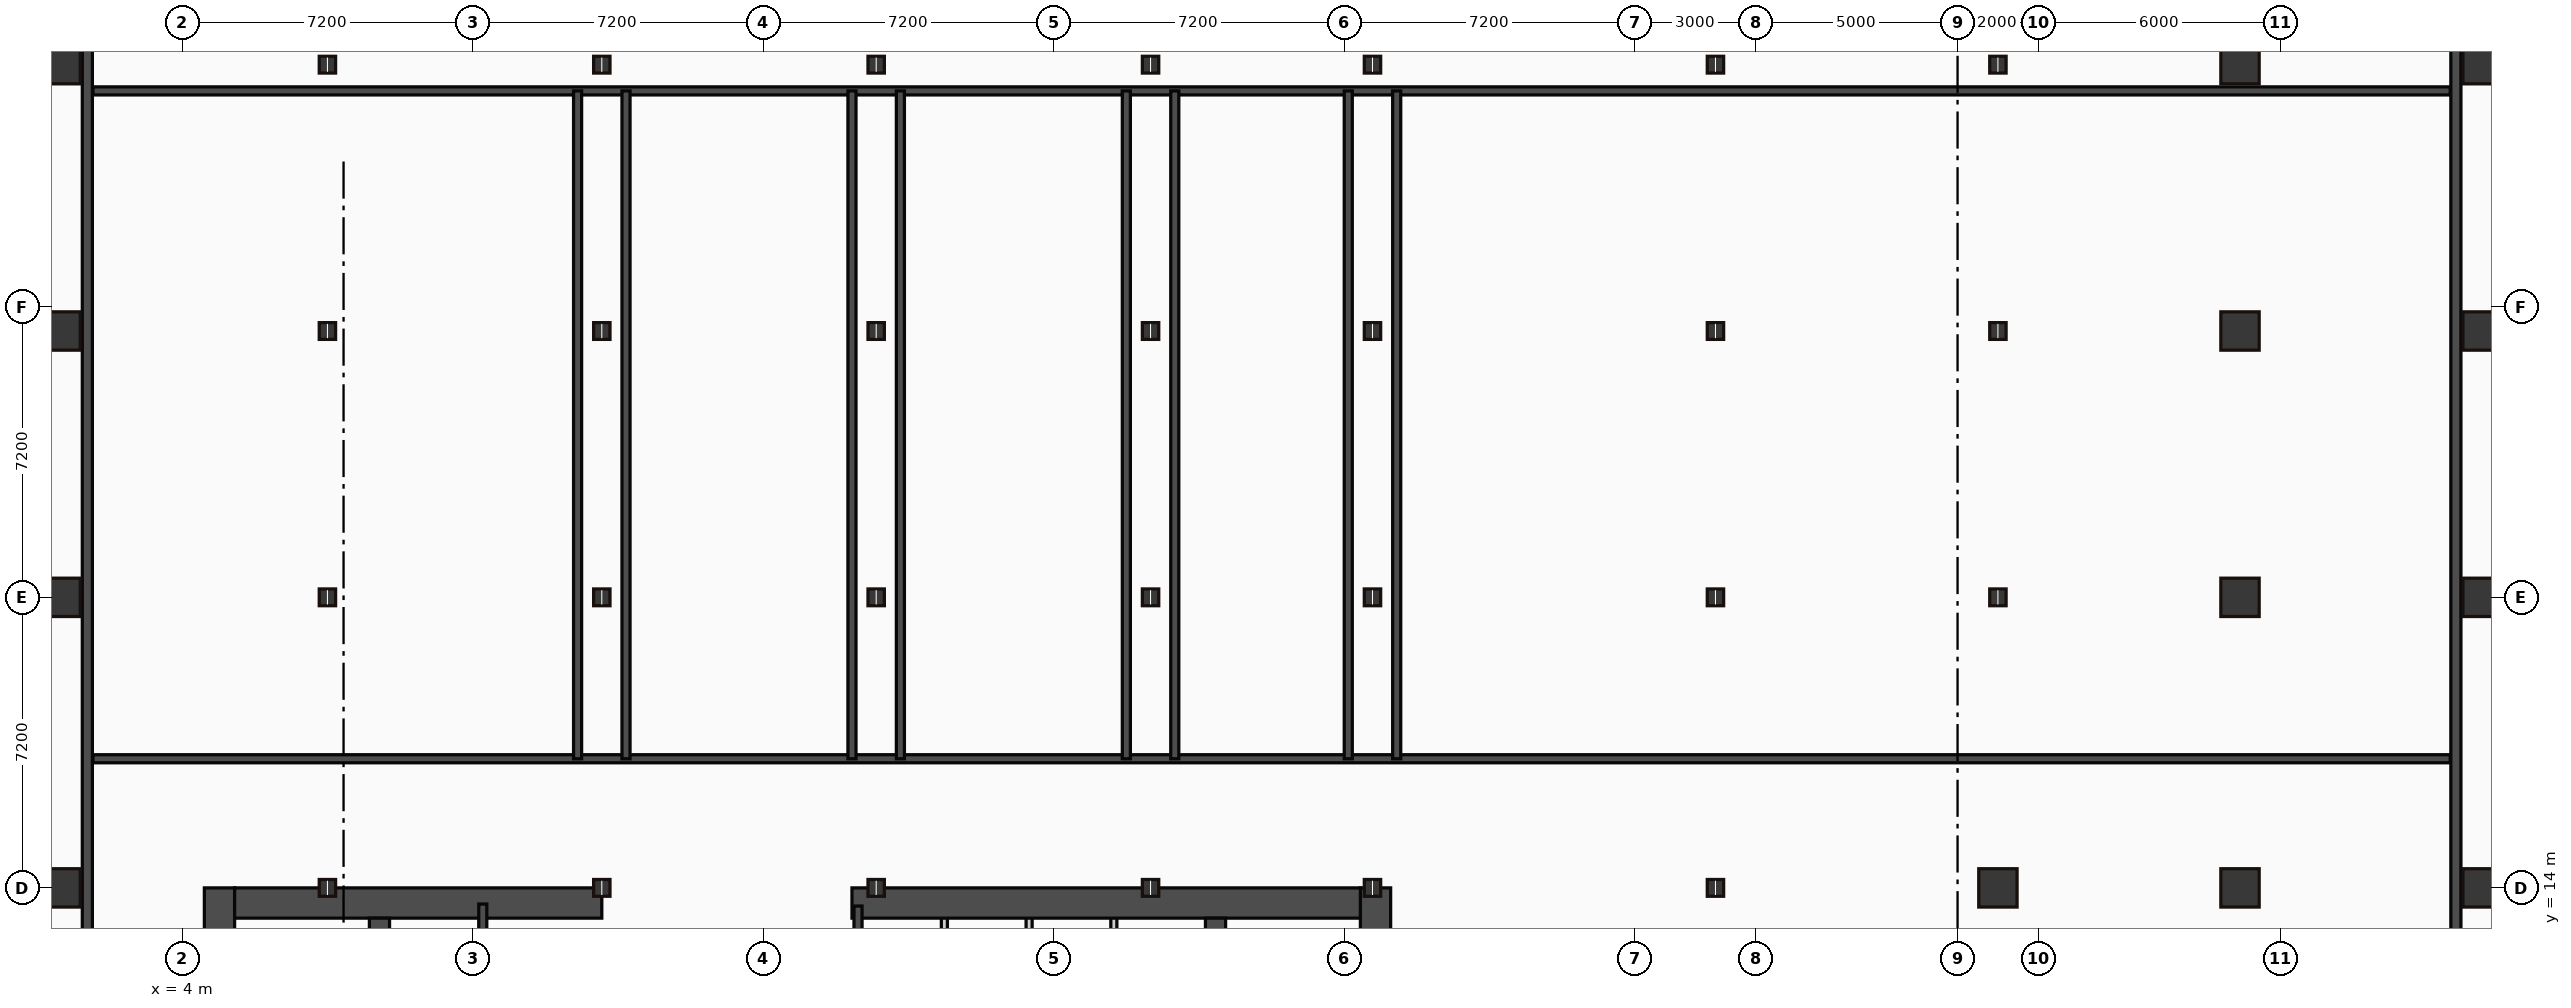
"""IFC4 building model, lengths in metres.
Left out: names, types, materials, properties, quantities, classifications, styles, units other than length and angle.
Written with IfcOpenShell. Run it as: python <this file> out.ifc"""

import sys

from ifc_helpers import new_model, si_unit, direction, frame, frame_2d, origin, origin_2d, place, context, subcontext, project, spatial, rectangle, hollow_rectangle, i_section, extrude, source, transform, mapped, element, fill, save


model = new_model("IFC4")
c1 = context("Model", 3, precision=1e-05, world=origin(), true_north=direction((0.0, 1.0)))
c2 = subcontext(c1, "Body", "Model", "MODEL_VIEW")
j1 = project(units=[si_unit("LENGTHUNIT", "METRE"), si_unit("PLANEANGLEUNIT", "RADIAN")], contexts=[c1])
p1 = place(None, origin())
s1 = spatial("IfcSite", under=j1, at=p1, CompositionType="ELEMENT")
p2 = place(p1, origin())
s2 = spatial("IfcBuilding", under=s1, at=p2, CompositionType="ELEMENT")
p3 = place(p2, frame((0.0, 0.0, 84.15)))
s3 = spatial("IfcBuildingStorey", under=s2, at=p3, CompositionType="ELEMENT", Elevation=84.15)
m1 = source(origin(), c2, "Body", "SweptSolid", [
    extrude(rectangle(XDim=13.1, YDim=0.75, at=frame_2d((6.55, 0.0))), origin(), (0.0, 0.0, 1.0), 4.5),
])
for number, where, z_axis, x_axis in (
    (1, (4.925, 0.9, 0.0), (0.0, 0.0, 1.0), (0.0, 1.0, 0.0)),
    (2, (33.575, 0.9, 0.0), (0.0, 0.0, 1.0), (0.0, 1.0, 0.0)),
):
    element("IfcWall", number, at=place(p3, frame(where, z_axis=z_axis, x_axis=x_axis)), inside=s3, PredefinedType="SHEAR", context=c2, shape_type="MappedRepresentation", body=[
        mapped(m1, transform((0.0, 0.0, 0.0))),
    ])
m2 = source(origin(), c2, "Body", "SweptSolid", [
    extrude(rectangle(XDim=9.1, YDim=0.75, at=frame_2d((4.55, 0.0))), origin(), (0.0, 0.0, 1.0), 4.5),
])
p4 = place(p3, frame((5.3, 13.625, 0.0), z_axis=(0.0, 0.0, 1.0), x_axis=(1.0, 0.0, 0.0)))
e3 = element("IfcWall", 3, at=p4, inside=s3, PredefinedType="SHEAR", context=c2, shape_type="MappedRepresentation", body=[
    mapped(m2, transform((0.0, 0.0, 0.0))),
])
p5 = place(p4, frame((4.1, 0.0, 0.0)))
e4 = element("IfcOpeningElement", 4, at=p5, cuts=e3, PredefinedType="OPENING", context=c2, shape_type="SweptSolid", body=[
    extrude(rectangle(XDim=1.1, YDim=2.15, at=frame_2d((0.55, 1.075))), frame((0.0, 0.385, 0.0), z_axis=(0.0, -1.0, 0.0), x_axis=(1.0, 0.0, 0.0)), (0.0, 0.0, 1.0), 0.77),
])
m3 = source(origin(), c2, "Body", "SweptSolid", [
    extrude(rectangle(XDim=12.6, YDim=0.75, at=frame_2d((6.3, 0.0))), origin(), (0.0, 0.0, 1.0), 4.5),
])
p6 = place(p3, frame((20.6, 13.625, 0.0), z_axis=(0.0, 0.0, 1.0), x_axis=(1.0, 0.0, 0.0)))
e5 = element("IfcWall", 5, at=p6, inside=s3, PredefinedType="SHEAR", context=c2, shape_type="MappedRepresentation", body=[
    mapped(m3, transform((0.0, 0.0, 0.0))),
])
p7 = place(p6, frame((9.25, 0.0, 0.0)))
e6 = element("IfcOpeningElement", 6, at=p7, cuts=e5, PredefinedType="OPENING", context=c2, shape_type="SweptSolid", body=[
    extrude(rectangle(XDim=1.1, YDim=2.15, at=frame_2d((0.55, 1.075))), frame((0.0, 0.385, 0.0), z_axis=(0.0, -1.0, 0.0), x_axis=(1.0, 0.0, 0.0)), (0.0, 0.0, 1.0), 0.77),
])
m4 = source(origin(), c2, "Body", "SweptSolid", [
    extrude(rectangle(XDim=12.35, YDim=0.5, at=frame_2d((6.175, 0.0))), origin(), (0.0, 0.0, 1.0), 4.5),
])
for number, where, z_axis, x_axis in (
    (7, (8.89, 0.9, 0.0), (0.0, 0.0, 1.0), (0.0, 1.0, 0.0)),
    (8, (29.61, 0.9, 0.0), (0.0, 0.0, 1.0), (0.0, 1.0, 0.0)),
):
    element("IfcWall", number, at=place(p3, frame(where, z_axis=z_axis, x_axis=x_axis)), inside=s3, PredefinedType="SHEAR", context=c2, shape_type="MappedRepresentation", body=[
        mapped(m4, transform((0.0, 0.0, 0.0))),
    ])
m5 = source(origin(), c2, "Body", "SweptSolid", [
    extrude(hollow_rectangle(XDim=0.95, YDim=0.95, WallThickness=0.045, at=origin_2d()), origin(), (0.0, 0.0, 1.0), 4.5),
])
for number, where, z_axis, x_axis in (
    (9, (1.0, 14.0, 0.0), (0.0, 0.0, 1.0), (1.0, 0.0, 0.0)),
    (10, (1.0, 21.2, 0.0), (0.0, 0.0, 1.0), (1.0, 0.0, 0.0)),
    (11, (1.0, 27.8, 0.0), (0.0, 0.0, 1.0), (1.0, 0.0, 0.0)),
    (12, (1.0, 34.4, 0.0), (0.0, 0.0, 1.0), (1.0, 0.0, 0.0)),
):
    element("IfcColumn", number, at=place(p3, frame(where, z_axis=z_axis, x_axis=x_axis)), inside=s3, PredefinedType="COLUMN", context=c2, shape_type="MappedRepresentation", body=[
        mapped(m5, transform((0.0, 0.0, 0.0))),
    ])
m6 = source(origin(), c2, "Body", "SweptSolid", [
    extrude(i_section(OverallWidth=0.406, OverallDepth=0.416, WebThickness=0.03, FlangeThickness=0.048, at=origin_2d()), origin(), (0.0, 0.0, 1.0), 4.5),
])
for number, where, z_axis, x_axis in (
    (13, (7.6, 14.0, 0.0), (0.0, 0.0, 1.0), (1.0, 0.0, 0.0)),
    (14, (7.6, 21.2, 0.0), (0.0, 0.0, 1.0), (1.0, 0.0, 0.0)),
    (15, (7.6, 27.8, 0.0), (0.0, 0.0, 1.0), (1.0, 0.0, 0.0)),
    (16, (7.6, 34.4, 0.0), (0.0, 0.0, 1.0), (1.0, 0.0, 0.0)),
    (17, (14.4, 14.0, 0.0), (0.0, 0.0, 1.0), (1.0, 0.0, 0.0)),
    (18, (14.4, 21.2, 0.0), (0.0, 0.0, 1.0), (1.0, 0.0, 0.0)),
    (19, (14.4, 27.8, 0.0), (0.0, 0.0, 1.0), (1.0, 0.0, 0.0)),
    (20, (14.4, 34.4, 0.0), (0.0, 0.0, 1.0), (1.0, 0.0, 0.0)),
    (21, (21.2, 14.0, 0.0), (0.0, 0.0, 1.0), (1.0, 0.0, 0.0)),
    (22, (21.2, 21.2, 0.0), (0.0, 0.0, 1.0), (1.0, 0.0, 0.0)),
    (23, (21.2, 27.8, 0.0), (0.0, 0.0, 1.0), (1.0, 0.0, 0.0)),
    (24, (21.2, 34.4, 0.0), (0.0, 0.0, 1.0), (1.0, 0.0, 0.0)),
    (25, (28.0, 14.0, 0.0), (0.0, 0.0, 1.0), (1.0, 0.0, 0.0)),
    (26, (28.0, 21.2, 0.0), (0.0, 0.0, 1.0), (1.0, 0.0, 0.0)),
    (27, (28.0, 27.8, 0.0), (0.0, 0.0, 1.0), (1.0, 0.0, 0.0)),
    (28, (28.0, 34.4, 0.0), (0.0, 0.0, 1.0), (1.0, 0.0, 0.0)),
    (29, (33.5, 14.0, 0.0), (0.0, 0.0, 1.0), (1.0, 0.0, 0.0)),
    (30, (33.5, 21.2, 0.0), (0.0, 0.0, 1.0), (1.0, 0.0, 0.0)),
    (31, (33.5, 27.8, 0.0), (0.0, 0.0, 1.0), (1.0, 0.0, 0.0)),
    (32, (33.5, 34.4, 0.0), (0.0, 0.0, 1.0), (1.0, 0.0, 0.0)),
    (33, (42.0, 14.0, 0.0), (0.0, 0.0, 1.0), (1.0, 0.0, 0.0)),
    (34, (42.0, 21.2, 0.0), (0.0, 0.0, 1.0), (1.0, 0.0, 0.0)),
    (35, (42.0, 27.8, 0.0), (0.0, 0.0, 1.0), (1.0, 0.0, 0.0)),
    (36, (42.0, 34.4, 0.0), (0.0, 0.0, 1.0), (1.0, 0.0, 0.0)),
):
    element("IfcColumn", number, at=place(p3, frame(where, z_axis=z_axis, x_axis=x_axis)), inside=s3, PredefinedType="COLUMN", context=c2, shape_type="MappedRepresentation", body=[
        mapped(m6, transform((0.0, 0.0, 0.0))),
    ])
p8 = place(p3, frame((49.0, 14.0, 0.0), z_axis=(0.0, 0.0, 1.0), x_axis=(1.0, 0.0, 0.0)))
e37 = element("IfcColumn", 37, at=p8, inside=s3, PredefinedType="COLUMN", context=c2, shape_type="MappedRepresentation", body=[
    mapped(m5, transform((0.0, 0.0, 0.0))),
])
for number, where, z_axis, x_axis in (
    (38, (49.0, 21.2, 0.0), (0.0, 0.0, 1.0), (1.0, 0.0, 0.0)),
    (39, (49.0, 27.8, 0.0), (0.0, 0.0, 1.0), (1.0, 0.0, 0.0)),
    (40, (49.0, 34.4, 0.0), (0.0, 0.0, 1.0), (1.0, 0.0, 0.0)),
):
    element("IfcColumn", number, at=place(p3, frame(where, z_axis=z_axis, x_axis=x_axis)), inside=s3, PredefinedType="COLUMN", context=c2, shape_type="MappedRepresentation", body=[
        mapped(m6, transform((0.0, 0.0, 0.0))),
    ])
for number, where, z_axis, x_axis in (
    (41, (55.0, 14.0, 0.0), (0.0, 0.0, 1.0), (1.0, 0.0, 0.0)),
    (42, (55.0, 21.2, 0.0), (0.0, 0.0, 1.0), (1.0, 0.0, 0.0)),
    (43, (55.0, 27.8, 0.0), (0.0, 0.0, 1.0), (1.0, 0.0, 0.0)),
    (44, (55.0, 34.4, 0.0), (0.0, 0.0, 1.0), (1.0, 0.0, 0.0)),
    (45, (61.0, 14.0, 0.0), (0.0, 0.0, 1.0), (1.0, 0.0, 0.0)),
    (46, (61.0, 21.2, 0.0), (0.0, 0.0, 1.0), (1.0, 0.0, 0.0)),
    (47, (61.0, 27.8, 0.0), (0.0, 0.0, 1.0), (1.0, 0.0, 0.0)),
    (48, (61.0, 34.4, 0.0), (0.0, 0.0, 1.0), (1.0, 0.0, 0.0)),
):
    element("IfcColumn", number, at=place(p3, frame(where, z_axis=z_axis, x_axis=x_axis)), inside=s3, PredefinedType="COLUMN", context=c2, shape_type="MappedRepresentation", body=[
        mapped(m5, transform((0.0, 0.0, 0.0))),
    ])
m7 = source(origin(), c2, "Body", "SweptSolid", [
    extrude(rectangle(XDim=29.2, YDim=0.25, at=frame_2d((14.6, 0.0))), origin(), (0.0, 0.0, 1.0), 4.25),
])
p9 = place(p3, frame((1.65, 6.15, 0.0), z_axis=(0.0, 0.0, 1.0), x_axis=(0.0, 1.0, 0.0)))
e49 = element("IfcWall", 49, at=p9, inside=s3, PredefinedType="STANDARD", context=c2, shape_type="MappedRepresentation", body=[
    mapped(m7, transform((0.0, 0.0, 0.0))),
])
m8 = source(origin(), c2, "Body", "SweptSolid", [
    extrude(rectangle(XDim=25.2, YDim=0.25, at=frame_2d((12.6, 0.0))), origin(), (0.0, 0.0, 1.0), 4.25),
])
p10 = place(p3, frame((60.35, 35.35, 0.0), z_axis=(0.0, 0.0, 1.0), x_axis=(0.0, -1.0, 0.0)))
e50 = element("IfcWall", 50, at=p10, inside=s3, PredefinedType="STANDARD", context=c2, shape_type="MappedRepresentation", body=[
    mapped(m8, transform((0.0, 0.0, 0.0))),
])
m9 = source(origin(), c2, "Body", "SweptSolid", [
    extrude(rectangle(XDim=3.18, YDim=0.2, at=frame_2d((1.59, 0.0))), origin(), (0.0, 0.0, 1.0), 4.25),
])
p11 = place(p3, frame((11.45, 10.42, 0.0), z_axis=(0.0, 0.0, 1.0), x_axis=(0.0, 1.0, 0.0)))
e51 = element("IfcWall", 51, at=p11, inside=s3, PredefinedType="PARTITIONING", context=c2, shape_type="MappedRepresentation", body=[
    mapped(m9, transform((0.0, 0.0, 0.0))),
])
m10 = source(origin(), c2, "Body", "SweptSolid", [
    extrude(rectangle(XDim=3.0, YDim=0.2, at=frame_2d((1.5, 0.0))), origin(), (0.0, 0.0, 1.0), 4.25),
])
p12 = place(p3, frame((20.75, 10.55, 0.0), z_axis=(0.0, 0.0, 1.0), x_axis=(0.0, 1.0, 0.0)))
e52 = element("IfcWall", 52, at=p12, inside=s3, PredefinedType="PARTITIONING", context=c2, shape_type="MappedRepresentation", body=[
    mapped(m10, transform((0.0, 0.0, 0.0))),
])
m11 = source(origin(), c2, "Body", "SweptSolid", [
    extrude(rectangle(XDim=2.85, YDim=0.15, at=frame_2d((1.425, 0.0))), origin(), (0.0, 0.0, 1.0), 4.25),
])
for number, where, z_axis, x_axis in (
    (53, (22.89, 10.6, 0.0), (0.0, 0.0, 1.0), (0.0, 1.0, 0.0)),
    (54, (24.99, 10.6, 0.0), (0.0, 0.0, 1.0), (0.0, 1.0, 0.0)),
    (55, (27.09, 10.6, 0.0), (0.0, 0.0, 1.0), (0.0, 1.0, 0.0)),
):
    element("IfcWall", number, at=place(p3, frame(where, z_axis=z_axis, x_axis=x_axis)), inside=s3, PredefinedType="PARTITIONING", context=c2, shape_type="MappedRepresentation", body=[
        mapped(m11, transform((0.0, 0.0, 0.0))),
    ])
m12 = source(origin(), c2, "Body", "SweptSolid", [
    extrude(rectangle(XDim=58.42, YDim=0.2, at=frame_2d((29.21, 0.0))), origin(), (0.0, 0.0, 1.0), 4.25),
])
p13 = place(p3, frame((1.79, 17.2, 0.0), z_axis=(0.0, 0.0, 1.0), x_axis=(1.0, 0.0, 0.0)))
e56 = element("IfcWall", 56, at=p13, inside=s3, PredefinedType="PARTITIONING", context=c2, shape_type="MappedRepresentation", body=[
    mapped(m12, transform((0.0, 0.0, 0.0))),
])
p14 = place(p13, frame((2.46, 0.0, 0.0)))
e57 = element("IfcOpeningElement", 57, at=p14, cuts=e56, PredefinedType="OPENING", context=c2, shape_type="SweptSolid", body=[
    extrude(rectangle(XDim=1.1, YDim=2.15, at=frame_2d((0.55, 1.075))), frame((0.0, 0.11, 0.0), z_axis=(0.0, -1.0, 0.0), x_axis=(1.0, 0.0, 0.0)), (0.0, 0.0, 1.0), 0.22),
])
p15 = place(p13, frame((14.86, 0.0, 0.0)))
e58 = element("IfcOpeningElement", 58, at=p15, cuts=e56, PredefinedType="OPENING", context=c2, shape_type="SweptSolid", body=[
    extrude(rectangle(XDim=1.1, YDim=2.15, at=frame_2d((0.55, 1.075))), frame((0.0, 0.11, 0.0), z_axis=(0.0, -1.0, 0.0), x_axis=(1.0, 0.0, 0.0)), (0.0, 0.0, 1.0), 0.22),
])
p16 = place(p13, frame((21.66, 0.0, 0.0)))
e59 = element("IfcOpeningElement", 59, at=p16, cuts=e56, PredefinedType="OPENING", context=c2, shape_type="SweptSolid", body=[
    extrude(rectangle(XDim=1.1, YDim=2.15, at=frame_2d((0.55, 1.075))), frame((0.0, 0.11, 0.0), z_axis=(0.0, -1.0, 0.0), x_axis=(1.0, 0.0, 0.0)), (0.0, 0.0, 1.0), 0.22),
])
p17 = place(p13, frame((27.86, 0.0, 0.0)))
e60 = element("IfcOpeningElement", 60, at=p17, cuts=e56, PredefinedType="OPENING", context=c2, shape_type="SweptSolid", body=[
    extrude(rectangle(XDim=1.1, YDim=2.15, at=frame_2d((0.55, 1.075))), frame((0.0, 0.11, 0.0), z_axis=(0.0, -1.0, 0.0), x_axis=(1.0, 0.0, 0.0)), (0.0, 0.0, 1.0), 0.22),
])
p18 = place(p13, frame((33.86, 0.0, 0.0)))
e61 = element("IfcOpeningElement", 61, at=p18, cuts=e56, PredefinedType="OPENING", context=c2, shape_type="SweptSolid", body=[
    extrude(rectangle(XDim=1.1, YDim=2.15, at=frame_2d((0.55, 1.075))), frame((0.0, 0.11, 0.0), z_axis=(0.0, -1.0, 0.0), x_axis=(1.0, 0.0, 0.0)), (0.0, 0.0, 1.0), 0.22),
])
p19 = place(p3, frame((1.79, 33.75, 0.0), z_axis=(0.0, 0.0, 1.0), x_axis=(1.0, 0.0, 0.0)))
e62 = element("IfcWall", 62, at=p19, inside=s3, PredefinedType="PARTITIONING", context=c2, shape_type="MappedRepresentation", body=[
    mapped(m12, transform((0.0, 0.0, 0.0))),
])
m13 = source(origin(), c2, "Body", "SweptSolid", [
    extrude(rectangle(XDim=16.55, YDim=0.2, at=frame_2d((8.275, 0.0))), origin(), (0.0, 0.0, 1.0), 4.25),
])
for number, where, z_axis, x_axis in (
    (63, (13.8, 17.2, 0.0), (0.0, 0.0, 1.0), (0.0, 1.0, 0.0)),
    (64, (15.0, 17.2, 0.0), (0.0, 0.0, 1.0), (0.0, 1.0, 0.0)),
    (65, (20.6, 17.2, 0.0), (0.0, 0.0, 1.0), (0.0, 1.0, 0.0)),
    (66, (21.8, 17.2, 0.0), (0.0, 0.0, 1.0), (0.0, 1.0, 0.0)),
    (67, (27.4, 17.2, 0.0), (0.0, 0.0, 1.0), (0.0, 1.0, 0.0)),
    (68, (28.6, 17.2, 0.0), (0.0, 0.0, 1.0), (0.0, 1.0, 0.0)),
    (69, (32.9, 17.2, 0.0), (0.0, 0.0, 1.0), (0.0, 1.0, 0.0)),
    (70, (34.1, 17.2, 0.0), (0.0, 0.0, 1.0), (0.0, 1.0, 0.0)),
):
    element("IfcWall", number, at=place(p3, frame(where, z_axis=z_axis, x_axis=x_axis)), inside=s3, PredefinedType="PARTITIONING", context=c2, shape_type="MappedRepresentation", body=[
        mapped(m13, transform((0.0, 0.0, 0.0))),
    ])
m14 = source(origin(), c2, "Body", "SweptSolid", [
    extrude(rectangle(XDim=1.1, YDim=2.15, at=frame_2d((0.55, 1.075))), frame((0.0, 0.025, 0.0), z_axis=(0.0, -1.0, 0.0), x_axis=(1.0, 0.0, 0.0)), (0.0, 0.0, 1.0), 0.05),
])
p20 = place(p5, origin())
e71 = element("IfcDoor", 71, at=p20, inside=s3, OperationType="SINGLE_SWING_RIGHT", PredefinedType="DOOR", context=c2, shape_type="MappedRepresentation", body=[
    mapped(m14, transform((0.0, 0.0, 0.0))),
])
fill(e4, e71)
p21 = place(p7, origin())
e72 = element("IfcDoor", 72, at=p21, inside=s3, OperationType="SINGLE_SWING_LEFT", PredefinedType="DOOR", context=c2, shape_type="MappedRepresentation", body=[
    mapped(m14, transform((0.0, 0.0, 0.0))),
])
fill(e6, e72)
p22 = place(p14, origin())
e73 = element("IfcDoor", 73, at=p22, inside=s3, OperationType="SINGLE_SWING_LEFT", PredefinedType="DOOR", context=c2, shape_type="MappedRepresentation", body=[
    mapped(m14, transform((0.0, 0.0, 0.0))),
])
fill(e57, e73)
p23 = place(p15, origin())
e74 = element("IfcDoor", 74, at=p23, inside=s3, OperationType="SINGLE_SWING_RIGHT", PredefinedType="DOOR", context=c2, shape_type="MappedRepresentation", body=[
    mapped(m14, transform((0.0, 0.0, 0.0))),
])
fill(e58, e74)
p24 = place(p16, origin())
e75 = element("IfcDoor", 75, at=p24, inside=s3, OperationType="SINGLE_SWING_LEFT", PredefinedType="DOOR", context=c2, shape_type="MappedRepresentation", body=[
    mapped(m14, transform((0.0, 0.0, 0.0))),
])
fill(e59, e75)
p25 = place(p17, origin())
e76 = element("IfcDoor", 76, at=p25, inside=s3, OperationType="SINGLE_SWING_RIGHT", PredefinedType="DOOR", context=c2, shape_type="MappedRepresentation", body=[
    mapped(m14, transform((0.0, 0.0, 0.0))),
])
fill(e60, e76)
p26 = place(p18, origin())
e77 = element("IfcDoor", 77, at=p26, inside=s3, OperationType="SINGLE_SWING_LEFT", PredefinedType="DOOR", context=c2, shape_type="MappedRepresentation", body=[
    mapped(m14, transform((0.0, 0.0, 0.0))),
])
fill(e61, e77)
save(model, sys.argv[1])
